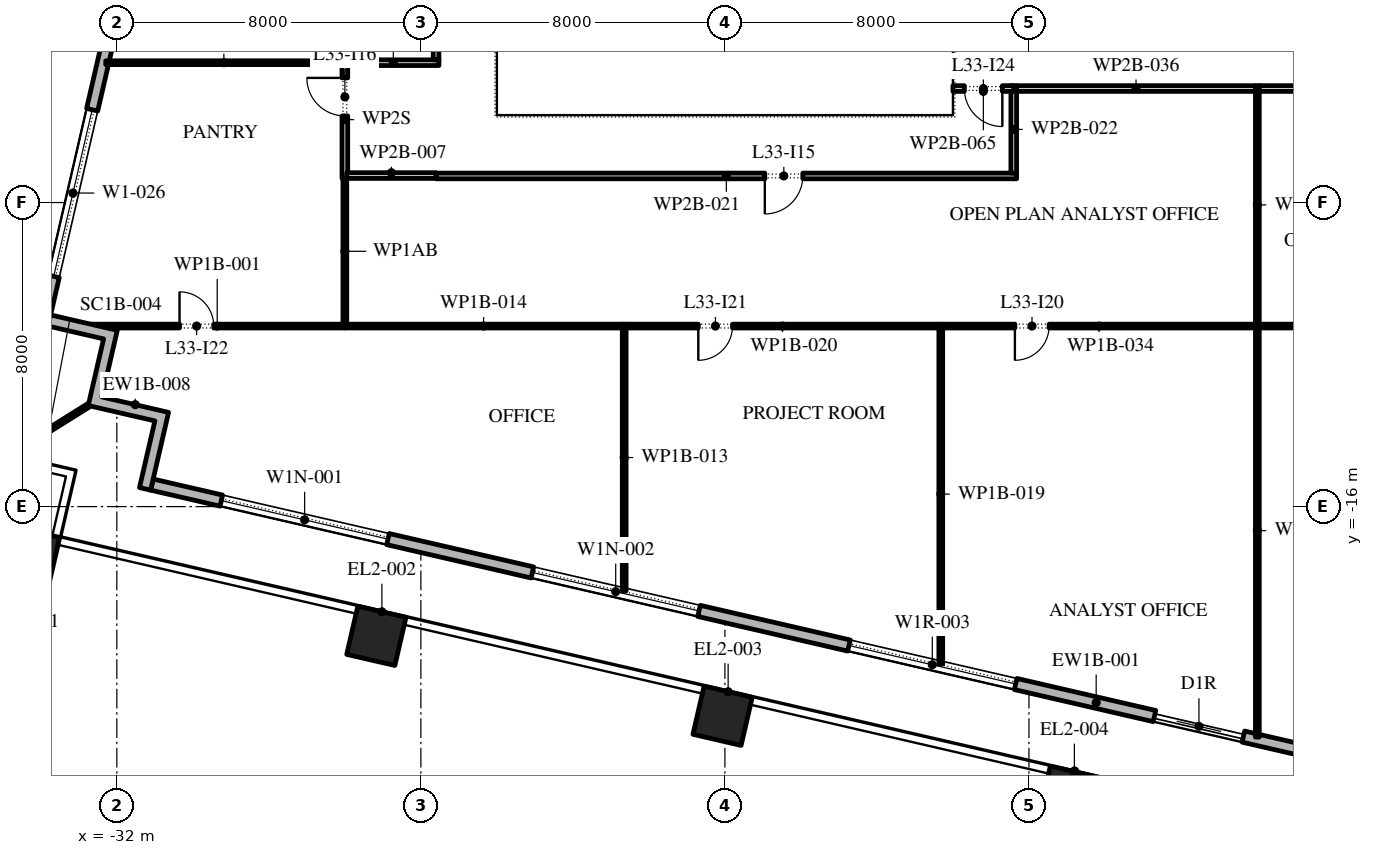
"""IFC4 building model, lengths in metres.
Left out: names, types, materials, properties, quantities, classifications, styles, units other than length and angle.
Written with IfcOpenShell. Run it as: python <this file> out.ifc"""

import sys

from ifc_helpers import new_model, si_unit, direction, frame, frame_2d, origin, origin_2d, place, context, subcontext, project, spatial, polyline, rectangle, outline, extrude, element, fill, save


model = new_model("IFC4")
c1 = context("Model", 3, precision=1e-05, world=origin(), true_north=direction((0.0, 1.0)))
c2 = subcontext(c1, "Body", "Model", "MODEL_VIEW")
j1 = project(units=[si_unit("LENGTHUNIT", "METRE"), si_unit("PLANEANGLEUNIT", "RADIAN")], contexts=[c1])
p1 = place(None, origin())
s1 = spatial("IfcSite", under=j1, at=p1, CompositionType="ELEMENT")
p2 = place(p1, origin())
s2 = spatial("IfcBuilding", under=s1, at=p2, CompositionType="ELEMENT")
p3 = place(p2, frame((0.0, 0.0, 151.8)))
s3 = spatial("IfcBuildingStorey", under=s2, at=p3, CompositionType="ELEMENT", Elevation=151.8)
for number, where, z_axis, x_axis in (
    (1, (-34.282, -17.298, 0.0), (0.0, 0.0, 1.0), (0.974, -0.225, 0.0)),
    (2, (-25.172, -19.402, 0.0), (0.0, 0.0, 1.0), (0.974, -0.225, 0.0)),
    (3, (-16.061, -21.505, 0.0), (0.0, 0.0, 1.0), (0.974, -0.225, 0.0)),
    (4, (-6.951, -23.608, 0.0), (0.0, 0.0, 1.0), (0.974, -0.225, 0.0)),
):
    element("IfcColumn", number, at=place(p3, frame(where, z_axis=z_axis, x_axis=x_axis)), inside=s3, PredefinedType="COLUMN", context=c2, shape_type="SweptSolid", body=[
        extrude(rectangle(XDim=1.3, YDim=1.3, at=origin_2d()), origin(), (0.0, 0.0, 1.0), 4.2),
    ])
p4 = place(p3, frame((-31.078, -15.421, 0.0), z_axis=(0.0, 0.0, 1.0), x_axis=(0.974370456532, -0.224949357493, 0.0)))
e5 = element("IfcWall", 5, at=p4, inside=s3, PredefinedType="STANDARD", context=c2, shape_type="SweptSolid", body=[
    extrude(rectangle(XDim=51.0, YDim=0.3, at=frame_2d((25.5, 0.0))), origin(), (0.0, 0.0, 1.0), 3.95),
])
p5 = place(p4, frame((1.875, 0.0, 0.45)))
e6 = element("IfcOpeningElement", 6, at=p5, cuts=e5, PredefinedType="OPENING", context=c2, shape_type="SweptSolid", body=[
    extrude(rectangle(XDim=4.5, YDim=2.525, at=frame_2d((2.25, 1.262))), frame((0.0, 0.16, 0.0), z_axis=(0.0, -1.0, 0.0), x_axis=(1.0, 0.0, 0.0)), (0.0, 0.0, 1.0), 0.32),
])
p6 = place(p4, frame((10.275, 0.0, 0.45)))
e7 = element("IfcOpeningElement", 7, at=p6, cuts=e5, PredefinedType="OPENING", context=c2, shape_type="SweptSolid", body=[
    extrude(rectangle(XDim=4.5, YDim=2.525, at=frame_2d((2.25, 1.262))), frame((0.0, 0.16, 0.0), z_axis=(0.0, -1.0, 0.0), x_axis=(1.0, 0.0, 0.0)), (0.0, 0.0, 1.0), 0.32),
])
p7 = place(p4, frame((18.825, 0.0, 0.45)))
e8 = element("IfcOpeningElement", 8, at=p7, cuts=e5, PredefinedType="OPENING", context=c2, shape_type="SweptSolid", body=[
    extrude(rectangle(XDim=4.5, YDim=2.4, at=frame_2d((2.25, 1.2))), frame((0.0, 0.16, 0.0), z_axis=(0.0, -1.0, 0.0), x_axis=(1.0, 0.0, 0.0)), (0.0, 0.0, 1.0), 0.32),
])
p8 = place(p4, frame((27.075, 0.0, 0.0)))
e9 = element("IfcOpeningElement", 9, at=p8, cuts=e5, PredefinedType="OPENING", context=c2, shape_type="SweptSolid", body=[
    extrude(rectangle(XDim=2.4, YDim=2.85, at=frame_2d((1.2, 1.425))), frame((0.0, 0.16, 0.0), z_axis=(0.0, -1.0, 0.0), x_axis=(1.0, 0.0, 0.0)), (0.0, 0.0, 1.0), 0.32),
])
p9 = place(p4, frame((35.925, 0.0, 0.45)))
e10 = element("IfcOpeningElement", 10, at=p9, cuts=e5, PredefinedType="OPENING", context=c2, shape_type="SweptSolid", body=[
    extrude(rectangle(XDim=4.5, YDim=2.4, at=frame_2d((2.25, 1.2))), frame((0.0, 0.16, 0.0), z_axis=(0.0, -1.0, 0.0), x_axis=(1.0, 0.0, 0.0)), (0.0, 0.0, 1.0), 0.32),
])
p10 = place(p4, frame((44.475, 0.0, 0.45)))
e11 = element("IfcOpeningElement", 11, at=p10, cuts=e5, PredefinedType="OPENING", context=c2, shape_type="SweptSolid", body=[
    extrude(rectangle(XDim=4.5, YDim=2.4, at=frame_2d((2.25, 1.2))), frame((0.0, 0.16, 0.0), z_axis=(0.0, -1.0, 0.0), x_axis=(1.0, 0.0, 0.0)), (0.0, 0.0, 1.0), 0.32),
])
p11 = place(p3, frame((-22.82, 37.016, 0.0), z_axis=(0.0, 0.0, 1.0), x_axis=(-0.224953880882, -0.974369412223, 0.0)))
e12 = element("IfcWall", 12, at=p11, inside=s3, PredefinedType="STANDARD", context=c2, shape_type="SweptSolid", body=[
    extrude(rectangle(XDim=49.5, YDim=0.3, at=frame_2d((24.75, 0.0))), origin(), (0.0, 0.0, 1.0), 3.95),
])
p12 = place(p11, frame((1.157, 0.0, 0.45)))
e13 = element("IfcOpeningElement", 13, at=p12, cuts=e12, PredefinedType="OPENING", context=c2, shape_type="SweptSolid", body=[
    extrude(rectangle(XDim=4.5, YDim=3.05, at=frame_2d((2.25, 1.525))), frame((0.0, 0.16, 0.0), z_axis=(0.0, -1.0, 0.0), x_axis=(1.0, 0.0, 0.0)), (0.0, 0.0, 1.0), 0.32),
])
p13 = place(p11, frame((8.121, 0.0, 0.45)))
e14 = element("IfcOpeningElement", 14, at=p13, cuts=e12, PredefinedType="OPENING", context=c2, shape_type="SweptSolid", body=[
    extrude(rectangle(XDim=4.5, YDim=3.0, at=frame_2d((2.25, 1.5))), frame((0.0, 0.16, 0.0), z_axis=(0.0, -1.0, 0.0), x_axis=(1.0, 0.0, 0.0)), (0.0, 0.0, 1.0), 0.32),
])
p14 = place(p11, frame((15.236, 0.0, 0.45)))
e15 = element("IfcOpeningElement", 15, at=p14, cuts=e12, PredefinedType="OPENING", context=c2, shape_type="SweptSolid", body=[
    extrude(rectangle(XDim=4.5, YDim=3.0, at=frame_2d((2.25, 1.5))), frame((0.0, 0.16, 0.0), z_axis=(0.0, -1.0, 0.0), x_axis=(1.0, 0.0, 0.0)), (0.0, 0.0, 1.0), 0.32),
])
p15 = place(p11, frame((23.4, 0.0, 0.0)))
e16 = element("IfcOpeningElement", 16, at=p15, cuts=e12, PredefinedType="OPENING", context=c2, shape_type="SweptSolid", body=[
    extrude(rectangle(XDim=2.4, YDim=3.5, at=frame_2d((1.2, 1.75))), frame((0.0, 0.16, 0.0), z_axis=(0.0, -1.0, 0.0), x_axis=(1.0, 0.0, 0.0)), (0.0, 0.0, 1.0), 0.32),
])
p16 = place(p11, frame((29.464, 0.0, 0.45)))
e17 = element("IfcOpeningElement", 17, at=p16, cuts=e12, PredefinedType="OPENING", context=c2, shape_type="SweptSolid", body=[
    extrude(rectangle(XDim=4.5, YDim=2.825, at=frame_2d((2.25, 1.413))), frame((0.0, 0.16, 0.0), z_axis=(0.0, -1.0, 0.0), x_axis=(1.0, 0.0, 0.0)), (0.0, 0.0, 1.0), 0.32),
])
p17 = place(p11, frame((36.579, 0.0, 0.45)))
e18 = element("IfcOpeningElement", 18, at=p17, cuts=e12, PredefinedType="OPENING", context=c2, shape_type="SweptSolid", body=[
    extrude(rectangle(XDim=4.5, YDim=2.625, at=frame_2d((2.25, 1.312))), frame((0.0, 0.16, 0.0), z_axis=(0.0, -1.0, 0.0), x_axis=(1.0, 0.0, 0.0)), (0.0, 0.0, 1.0), 0.32),
])
p18 = place(p11, frame((43.693, 0.0, 0.45)))
e19 = element("IfcOpeningElement", 19, at=p18, cuts=e12, PredefinedType="OPENING", context=c2, shape_type="SweptSolid", body=[
    extrude(rectangle(XDim=4.5, YDim=3.05, at=frame_2d((2.25, 1.525))), frame((0.0, 0.16, 0.0), z_axis=(0.0, -1.0, 0.0), x_axis=(1.0, 0.0, 0.0)), (0.0, 0.0, 1.0), 0.32),
])
p19 = place(p3, origin())
e20 = element("IfcWall", 20, at=p19, inside=s3, PredefinedType="STANDARD", context=c2, shape_type="SweptSolid", body=[
    extrude(outline(polyline([(-32.393, -13.116), (-30.639, -13.521), (-31.111, -15.567), (-31.404, -15.5), (-30.999, -13.746), (-32.753, -13.341), (-32.348, -11.587), (-33.809, -11.25), (-33.742, -10.957), (-31.988, -11.362), (-32.393, -13.116)])), origin(), (0.0, 0.0, 1.0), 3.95),
])
p20 = place(p3, frame((-32.753, -13.341, -0.05), z_axis=(0.0, 0.0, 1.0), x_axis=(-0.848059759764, -0.529900598103, 0.0)))
e21 = element("IfcWall", 21, at=p20, inside=s3, PredefinedType="STANDARD", context=c2, shape_type="SweptSolid", body=[
    extrude(rectangle(XDim=2.455, YDim=0.1, at=frame_2d((1.228, 0.0))), origin(), (0.0, 0.0, 1.0), 4.0),
])
p21 = place(p3, frame((-26.0, -11.25, 0.0), z_axis=(0.0, 0.0, 1.0), x_axis=(-1.0, 0.0, 0.0)))
e22 = element("IfcWall", 22, at=p21, inside=s3, PredefinedType="PARTITIONING", context=c2, shape_type="SweptSolid", body=[
    extrude(rectangle(XDim=6.718, YDim=0.1, at=frame_2d((3.359, 0.0))), origin(), (0.0, 0.0, 1.0), 3.95),
])
p22 = place(p21, frame((3.45, 0.0, 0.0)))
e23 = element("IfcOpeningElement", 23, at=p22, cuts=e22, PredefinedType="OPENING", context=c2, shape_type="SweptSolid", body=[
    extrude(rectangle(XDim=0.9, YDim=2.1, at=frame_2d((0.45, 1.05))), frame((0.0, 0.06, 0.0), z_axis=(0.0, -1.0, 0.0), x_axis=(1.0, 0.0, 0.0)), (0.0, 0.0, 1.0), 0.12),
])
p23 = place(p3, frame((-26.0, -11.2, 0.0), z_axis=(0.0, 0.0, 1.0), x_axis=(0.0, 1.0, 0.0)))
e24 = element("IfcWall", 24, at=p23, inside=s3, PredefinedType="PARTITIONING", context=c2, shape_type="SweptSolid", body=[
    extrude(rectangle(XDim=3.835, YDim=0.1, at=frame_2d((1.917, 0.0))), origin(), (0.0, 0.0, 1.0), 3.114),
])
p24 = place(p3, frame((-26.0, -7.365, 0.0), z_axis=(0.0, 0.0, 1.0), x_axis=(0.0, 1.0, 0.0)))
e25 = element("IfcWall", 25, at=p24, inside=s3, PredefinedType="PARTITIONING", context=c2, shape_type="SweptSolid", body=[
    extrude(rectangle(XDim=3.095, YDim=0.15, at=frame_2d((1.547, 0.0))), origin(), (0.0, 0.0, 1.0), 3.114),
])
p25 = place(p24, frame((1.645, 0.0, 0.0)))
e26 = element("IfcOpeningElement", 26, at=p25, cuts=e25, PredefinedType="OPENING", context=c2, shape_type="SweptSolid", body=[
    extrude(rectangle(XDim=1.0, YDim=2.1, at=frame_2d((0.5, 1.05))), frame((0.0, 0.085, 0.0), z_axis=(0.0, -1.0, 0.0), x_axis=(1.0, 0.0, 0.0)), (0.0, 0.0, 1.0), 0.17),
])
p26 = place(p3, frame((-26.075, -4.32, 0.0), z_axis=(0.0, 0.0, 1.0), x_axis=(-1.0, 0.0, 0.0)))
e27 = element("IfcWall", 27, at=p26, inside=s3, PredefinedType="PARTITIONING", context=c2, shape_type="SweptSolid", body=[
    extrude(rectangle(XDim=6.217, YDim=0.1, at=frame_2d((3.108, 0.0))), origin(), (0.0, 0.0, 1.0), 3.95),
])
p27 = place(p3, frame((-25.925, -4.32, 0.0), z_axis=(0.0, 0.0, 1.0), x_axis=(1.0, 0.0, 0.0)))
e28 = element("IfcWall", 28, at=p27, inside=s3, PredefinedType="PARTITIONING", context=c2, shape_type="SweptSolid", body=[
    extrude(rectangle(XDim=2.4, YDim=0.15, at=frame_2d((1.2, 0.0))), origin(), (0.0, 0.0, 1.0), 3.95),
])
p28 = place(p3, frame((-23.6, -7.29, 0.0), z_axis=(0.0, 0.0, 1.0), x_axis=(-1.0, 0.0, 0.0)))
e29 = element("IfcWall", 29, at=p28, inside=s3, PredefinedType="PARTITIONING", context=c2, shape_type="SweptSolid", body=[
    extrude(rectangle(XDim=2.35, YDim=0.15, at=frame_2d((1.175, 0.0))), origin(), (0.0, 0.0, 1.0), 3.95),
])
p29 = place(p3, frame((-23.6, -4.245, 0.0), z_axis=(0.0, 0.0, 1.0), x_axis=(0.0, 1.0, 0.0)))
e30 = element("IfcWall", 30, at=p29, inside=s3, PredefinedType="PARTITIONING", context=c2, shape_type="SweptSolid", body=[
    extrude(rectangle(XDim=14.685, YDim=0.15, at=frame_2d((7.343, 0.0))), origin(), (0.0, 0.0, 1.0), 3.95),
])
p30 = place(p29, frame((3.735, 0.0, 0.0)))
e31 = element("IfcOpeningElement", 31, at=p30, cuts=e30, PredefinedType="OPENING", context=c2, shape_type="SweptSolid", body=[
    extrude(rectangle(XDim=1.0, YDim=2.1, at=frame_2d((0.5, 1.05))), frame((0.0, 0.085, 0.0), z_axis=(0.0, -1.0, 0.0), x_axis=(1.0, 0.0, 0.0)), (0.0, 0.0, 1.0), 0.17),
])
p31 = place(p3, frame((-18.65, -18.219, 0.0), z_axis=(0.0, 0.0, 1.0), x_axis=(0.0, 1.0, 0.0)))
e32 = element("IfcWall", 32, at=p31, inside=s3, PredefinedType="PARTITIONING", context=c2, shape_type="SweptSolid", body=[
    extrude(rectangle(XDim=7.019, YDim=0.1, at=frame_2d((3.51, 0.0))), origin(), (0.0, 0.0, 1.0), 3.95),
])
p32 = place(p3, frame((-18.7, -11.25, 0.0), z_axis=(0.0, 0.0, 1.0), x_axis=(-1.0, 0.0, 0.0)))
e33 = element("IfcWall", 33, at=p32, inside=s3, PredefinedType="PARTITIONING", context=c2, shape_type="SweptSolid", body=[
    extrude(rectangle(XDim=7.3, YDim=0.1, at=frame_2d((3.65, 0.0))), origin(), (0.0, 0.0, 1.0), 3.95),
])
p33 = place(p3, frame((-10.32, -20.142, 0.0), z_axis=(0.0, 0.0, 1.0), x_axis=(0.0, 1.0, 0.0)))
e34 = element("IfcWall", 34, at=p33, inside=s3, PredefinedType="PARTITIONING", context=c2, shape_type="SweptSolid", body=[
    extrude(rectangle(XDim=8.942, YDim=0.1, at=frame_2d((4.471, 0.0))), origin(), (0.0, 0.0, 1.0), 3.95),
])
p34 = place(p3, frame((-10.37, -11.25, 0.0), z_axis=(0.0, 0.0, 1.0), x_axis=(-1.0, 0.0, 0.0)))
e35 = element("IfcWall", 35, at=p34, inside=s3, PredefinedType="PARTITIONING", context=c2, shape_type="SweptSolid", body=[
    extrude(rectangle(XDim=8.23, YDim=0.1, at=frame_2d((4.115, 0.0))), origin(), (0.0, 0.0, 1.0), 3.95),
])
p35 = place(p34, frame((5.43, 0.0, 0.0)))
e36 = element("IfcOpeningElement", 36, at=p35, cuts=e35, PredefinedType="OPENING", context=c2, shape_type="SweptSolid", body=[
    extrude(rectangle(XDim=0.9, YDim=2.1, at=frame_2d((0.45, 1.05))), frame((0.0, 0.06, 0.0), z_axis=(0.0, -1.0, 0.0), x_axis=(1.0, 0.0, 0.0)), (0.0, 0.0, 1.0), 0.12),
])
p36 = place(p3, frame((-8.325, -7.3, 0.0), z_axis=(0.0, 0.0, 1.0), x_axis=(-1.0, 0.0, 0.0)))
e37 = element("IfcWall", 37, at=p36, inside=s3, PredefinedType="PARTITIONING", context=c2, shape_type="SweptSolid", body=[
    extrude(rectangle(XDim=15.275, YDim=0.15, at=frame_2d((7.638, 0.0))), origin(), (0.0, 0.0, 1.0), 3.95),
])
p37 = place(p36, frame((5.625, 0.0, 0.0)))
e38 = element("IfcOpeningElement", 38, at=p37, cuts=e37, PredefinedType="OPENING", context=c2, shape_type="SweptSolid", body=[
    extrude(rectangle(XDim=1.0, YDim=2.1, at=frame_2d((0.5, 1.05))), frame((0.0, 0.085, 0.0), z_axis=(0.0, -1.0, 0.0), x_axis=(1.0, 0.0, 0.0)), (0.0, 0.0, 1.0), 0.17),
])
p38 = place(p3, frame((-8.4, -4.925, 0.0), z_axis=(0.0, 0.0, 1.0), x_axis=(0.0, -1.0, 0.0)))
e39 = element("IfcWall", 39, at=p38, inside=s3, PredefinedType="PARTITIONING", context=c2, shape_type="SweptSolid", body=[
    extrude(rectangle(XDim=2.3, YDim=0.15, at=frame_2d((1.15, 0.0))), origin(), (0.0, 0.0, 1.0), 3.95),
])
p39 = place(p3, frame((-1.99, -22.065, 0.0), z_axis=(0.0, 0.0, 1.0), x_axis=(0.0, 1.0, 0.0)))
e40 = element("IfcWall", 40, at=p39, inside=s3, PredefinedType="PARTITIONING", context=c2, shape_type="SweptSolid", body=[
    extrude(rectangle(XDim=10.865, YDim=0.1, at=frame_2d((5.433, 0.0))), origin(), (0.0, 0.0, 1.0), 3.95),
])
p40 = place(p3, frame((-2.04, -11.25, 0.0), z_axis=(0.0, 0.0, 1.0), x_axis=(-1.0, 0.0, 0.0)))
e41 = element("IfcWall", 41, at=p40, inside=s3, PredefinedType="PARTITIONING", context=c2, shape_type="SweptSolid", body=[
    extrude(rectangle(XDim=8.23, YDim=0.1, at=frame_2d((4.115, 0.0))), origin(), (0.0, 0.0, 1.0), 3.95),
])
p41 = place(p40, frame((5.43, 0.0, 0.0)))
e42 = element("IfcOpeningElement", 42, at=p41, cuts=e41, PredefinedType="OPENING", context=c2, shape_type="SweptSolid", body=[
    extrude(rectangle(XDim=0.9, YDim=2.1, at=frame_2d((0.45, 1.05))), frame((0.0, 0.06, 0.0), z_axis=(0.0, -1.0, 0.0), x_axis=(1.0, 0.0, 0.0)), (0.0, 0.0, 1.0), 0.12),
])
p42 = place(p3, frame((-1.99, -11.2, 0.0), z_axis=(0.0, 0.0, 1.0), x_axis=(0.0, 1.0, 0.0)))
e43 = element("IfcWall", 43, at=p42, inside=s3, PredefinedType="PARTITIONING", context=c2, shape_type="SweptSolid", body=[
    extrude(rectangle(XDim=6.275, YDim=0.1, at=frame_2d((3.137, 0.0))), origin(), (0.0, 0.0, 1.0), 3.95),
])
p43 = place(p3, frame((-2.04, -5.0, 0.0), z_axis=(0.0, 0.0, 1.0), x_axis=(-1.0, 0.0, 0.0)))
e44 = element("IfcWall", 44, at=p43, inside=s3, PredefinedType="PARTITIONING", context=c2, shape_type="SweptSolid", body=[
    extrude(rectangle(XDim=6.285, YDim=0.15, at=frame_2d((3.143, 0.0))), origin(), (0.0, 0.0, 1.0), 3.95),
])
p44 = place(p3, frame((8.325, -5.0, 0.0), z_axis=(0.0, 0.0, 1.0), x_axis=(-1.0, 0.0, 0.0)))
e45 = element("IfcWall", 45, at=p44, inside=s3, PredefinedType="PARTITIONING", context=c2, shape_type="SweptSolid", body=[
    extrude(rectangle(XDim=10.265, YDim=0.15, at=frame_2d((5.132, 0.0))), origin(), (0.0, 0.0, 1.0), 3.95),
])
p45 = place(p44, frame((4.665, 0.0, 0.0)))
e46 = element("IfcOpeningElement", 46, at=p45, cuts=e45, PredefinedType="OPENING", context=c2, shape_type="SweptSolid", body=[
    extrude(rectangle(XDim=1.0, YDim=2.1, at=frame_2d((0.5, 1.05))), frame((0.0, 0.085, 0.0), z_axis=(0.0, -1.0, 0.0), x_axis=(1.0, 0.0, 0.0)), (0.0, 0.0, 1.0), 0.17),
])
p46 = place(p3, frame((10.05, -11.25, 0.0), z_axis=(0.0, 0.0, 1.0), x_axis=(-1.0, 0.0, 0.0)))
e47 = element("IfcWall", 47, at=p46, inside=s3, PredefinedType="PARTITIONING", context=c2, shape_type="SweptSolid", body=[
    extrude(rectangle(XDim=11.99, YDim=0.1, at=frame_2d((5.995, 0.0))), origin(), (0.0, 0.0, 1.0), 3.95),
])
p47 = place(p46, frame((4.44, 0.0, 0.0)))
e48 = element("IfcOpeningElement", 48, at=p47, cuts=e47, PredefinedType="OPENING", context=c2, shape_type="SweptSolid", body=[
    extrude(rectangle(XDim=0.9, YDim=2.1, at=frame_2d((0.45, 1.05))), frame((0.0, 0.06, 0.0), z_axis=(0.0, -1.0, 0.0), x_axis=(1.0, 0.0, 0.0)), (0.0, 0.0, 1.0), 0.12),
])
p48 = place(p3, frame((-8.4, -5.0, 0.0), z_axis=(0.0, 0.0, 1.0), x_axis=(-1.0, 0.0, 0.0)))
e49 = element("IfcWall", 49, at=p48, inside=s3, PredefinedType="PARTITIONING", context=c2, shape_type="SweptSolid", body=[
    extrude(rectangle(XDim=1.6, YDim=0.15, at=frame_2d((0.8, 0.0))), origin(), (0.0, 0.0, 1.0), 3.95),
])
p49 = place(p48, frame((0.3, 0.0, 0.0)))
e50 = element("IfcOpeningElement", 50, at=p49, cuts=e49, PredefinedType="OPENING", context=c2, shape_type="SweptSolid", body=[
    extrude(rectangle(XDim=1.0, YDim=2.1, at=frame_2d((0.5, 1.05))), frame((0.0, 0.085, 0.0), z_axis=(0.0, -1.0, 0.0), x_axis=(1.0, 0.0, 0.0)), (0.0, 0.0, 1.0), 0.17),
])
p50 = place(p5, origin())
e51 = element("IfcWindow", 51, at=p50, inside=s3, PartitioningType="DOUBLE_PANEL_VERTICAL", PredefinedType="WINDOW", context=c2, shape_type="SweptSolid", body=[
    extrude(rectangle(XDim=4.5, YDim=2.525, at=frame_2d((2.25, 1.262))), frame((0.0, 0.03, 0.0), z_axis=(0.0, -1.0, 0.0), x_axis=(1.0, 0.0, 0.0)), (0.0, 0.0, 1.0), 0.06),
])
fill(e6, e51)
p51 = place(p6, origin())
e52 = element("IfcWindow", 52, at=p51, inside=s3, PartitioningType="DOUBLE_PANEL_VERTICAL", PredefinedType="WINDOW", context=c2, shape_type="SweptSolid", body=[
    extrude(rectangle(XDim=4.5, YDim=2.525, at=frame_2d((2.25, 1.262))), frame((0.0, 0.03, 0.0), z_axis=(0.0, -1.0, 0.0), x_axis=(1.0, 0.0, 0.0)), (0.0, 0.0, 1.0), 0.06),
])
fill(e7, e52)
p52 = place(p7, origin())
e53 = element("IfcWindow", 53, at=p52, inside=s3, PartitioningType="DOUBLE_PANEL_VERTICAL", PredefinedType="WINDOW", context=c2, shape_type="SweptSolid", body=[
    extrude(rectangle(XDim=4.5, YDim=2.4, at=frame_2d((2.25, 1.2))), frame((0.0, 0.03, 0.0), z_axis=(0.0, -1.0, 0.0), x_axis=(1.0, 0.0, 0.0)), (0.0, 0.0, 1.0), 0.06),
])
fill(e8, e53)
p53 = place(p8, origin())
e54 = element("IfcDoor", 54, at=p53, inside=s3, OperationType="DOUBLE_DOOR_SLIDING", PredefinedType="DOOR", context=c2, shape_type="SweptSolid", body=[
    extrude(rectangle(XDim=2.4, YDim=2.85, at=frame_2d((1.2, 1.425))), frame((0.0, 0.025, 0.0), z_axis=(0.0, -1.0, 0.0), x_axis=(1.0, 0.0, 0.0)), (0.0, 0.0, 1.0), 0.05),
])
fill(e9, e54)
p54 = place(p18, origin())
e55 = element("IfcWindow", 55, at=p54, inside=s3, PartitioningType="DOUBLE_PANEL_VERTICAL", PredefinedType="WINDOW", context=c2, shape_type="SweptSolid", body=[
    extrude(rectangle(XDim=4.5, YDim=3.05, at=frame_2d((2.25, 1.525))), frame((0.0, 0.03, 0.0), z_axis=(0.0, -1.0, 0.0), x_axis=(1.0, 0.0, 0.0)), (0.0, 0.0, 1.0), 0.06),
])
fill(e19, e55)
p55 = place(p37, origin())
e56 = element("IfcDoor", 56, at=p55, inside=s3, OperationType="SINGLE_SWING_LEFT", PredefinedType="DOOR", context=c2, shape_type="SweptSolid", body=[
    extrude(rectangle(XDim=1.0, YDim=2.1, at=frame_2d((0.5, 1.05))), frame((0.0, 0.025, 0.0), z_axis=(0.0, -1.0, 0.0), x_axis=(1.0, 0.0, 0.0)), (0.0, 0.0, 1.0), 0.05),
])
fill(e38, e56)
p56 = place(p25, origin())
e57 = element("IfcDoor", 57, at=p56, inside=s3, OperationType="SINGLE_SWING_LEFT", PredefinedType="DOOR", context=c2, shape_type="SweptSolid", body=[
    extrude(rectangle(XDim=1.0, YDim=2.1, at=frame_2d((0.5, 1.05))), frame((0.0, 0.025, 0.0), z_axis=(0.0, -1.0, 0.0), x_axis=(1.0, 0.0, 0.0)), (0.0, 0.0, 1.0), 0.05),
])
fill(e26, e57)
p57 = place(p41, origin())
e58 = element("IfcDoor", 58, at=p57, inside=s3, OperationType="SINGLE_SWING_LEFT", PredefinedType="DOOR", context=c2, shape_type="SweptSolid", body=[
    extrude(rectangle(XDim=0.9, YDim=2.1, at=frame_2d((0.45, 1.05))), frame((0.0, 0.025, 0.0), z_axis=(0.0, -1.0, 0.0), x_axis=(1.0, 0.0, 0.0)), (0.0, 0.0, 1.0), 0.05),
])
fill(e42, e58)
p58 = place(p35, origin())
e59 = element("IfcDoor", 59, at=p58, inside=s3, OperationType="SINGLE_SWING_LEFT", PredefinedType="DOOR", context=c2, shape_type="SweptSolid", body=[
    extrude(rectangle(XDim=0.9, YDim=2.1, at=frame_2d((0.45, 1.05))), frame((0.0, 0.025, 0.0), z_axis=(0.0, -1.0, 0.0), x_axis=(1.0, 0.0, 0.0)), (0.0, 0.0, 1.0), 0.05),
])
fill(e36, e59)
p59 = place(p22, frame((0.9, 0.0, 0.0), z_axis=(0.0, 0.0, 1.0), x_axis=(-1.0, 0.0, 0.0)))
e60 = element("IfcDoor", 60, at=p59, inside=s3, OperationType="SINGLE_SWING_RIGHT", PredefinedType="DOOR", context=c2, shape_type="SweptSolid", body=[
    extrude(rectangle(XDim=0.9, YDim=2.1, at=frame_2d((0.45, 1.05))), frame((0.0, 0.025, 0.0), z_axis=(0.0, -1.0, 0.0), x_axis=(1.0, 0.0, 0.0)), (0.0, 0.0, 1.0), 0.05),
])
fill(e23, e60)
p60 = place(p49, origin())
e61 = element("IfcDoor", 61, at=p60, inside=s3, OperationType="SINGLE_SWING_RIGHT", PredefinedType="DOOR", context=c2, shape_type="SweptSolid", body=[
    extrude(rectangle(XDim=1.0, YDim=2.1, at=frame_2d((0.5, 1.05))), frame((0.0, 0.025, 0.0), z_axis=(0.0, -1.0, 0.0), x_axis=(1.0, 0.0, 0.0)), (0.0, 0.0, 1.0), 0.05),
])
fill(e50, e61)
save(model, sys.argv[1])
